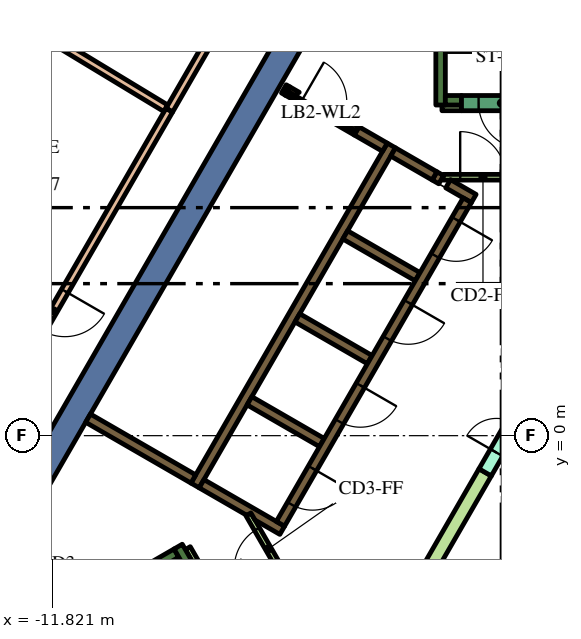
"""IFC4 building model, lengths in metres.
Left out: names, types, materials, properties, quantities, classifications, styles, units other than length and angle.
Written with IfcOpenShell. Run it as: python <this file> out.ifc"""

import sys

from ifc_helpers import new_model, si_unit, direction, frame, frame_2d, origin, place, context, subcontext, project, spatial, polyline, rectangle, outline, extrude, element, fill, save


model = new_model("IFC4")
c1 = context("Model", 3, precision=1e-05, world=origin(), true_north=direction((0.0, 1.0)))
c2 = subcontext(c1, "Body", "Model", "MODEL_VIEW")
j1 = project(units=[si_unit("LENGTHUNIT", "METRE"), si_unit("PLANEANGLEUNIT", "RADIAN")], contexts=[c1])
p1 = place(None, origin())
s1 = spatial("IfcSite", under=j1, at=p1, CompositionType="ELEMENT")
p2 = place(p1, origin())
s2 = spatial("IfcBuilding", under=s1, at=p2, CompositionType="ELEMENT")
p3 = place(p2, frame((0.0, 0.0, 256.2)))
s3 = spatial("IfcBuildingStorey", under=s2, at=p3, CompositionType="ELEMENT", Elevation=256.2)
p4 = place(p3, frame((-12.625, -1.867, 0.0), z_axis=(0.0, 0.0, 1.0), x_axis=(0.499996974394, 0.866027150612, 0.0)))
e1 = element("IfcWall", 1, at=p4, inside=s3, PredefinedType="SOLIDWALL", context=c2, shape_type="SweptSolid", body=[
    extrude(rectangle(XDim=15.858, YDim=0.7, at=frame_2d((7.929, 0.0))), origin(), (0.0, 0.0, 1.0), 5.4),
])
p5 = place(p3, frame((-1.6, 8.7, 0.0), z_axis=(0.0, 0.0, 1.0), x_axis=(0.0, 1.0, 0.0)))
e2 = element("IfcWall", 2, at=p5, inside=s3, PredefinedType="SOLIDWALL", context=c2, shape_type="SweptSolid", body=[
    extrude(rectangle(XDim=7.05, YDim=0.25, at=frame_2d((3.525, 0.0))), origin(), (0.0, 0.0, 1.0), 5.4),
])
p6 = place(p3, frame((-1.475, 8.825, 0.0), z_axis=(0.0, 0.0, 1.0), x_axis=(1.0, 0.0, 0.0)))
e3 = element("IfcWall", 3, at=p6, inside=s3, PredefinedType="SOLIDWALL", context=c2, shape_type="SweptSolid", body=[
    extrude(rectangle(XDim=0.425, YDim=0.25, at=frame_2d((0.212, 0.0))), origin(), (0.0, 0.0, 1.0), 5.4),
])
p7 = place(p3, frame((-14.44, -6.49, 0.0), z_axis=(0.0, 0.0, 1.0), x_axis=(0.866022966069, 0.500004222222, 0.0)))
e4 = element("IfcWall", 4, at=p7, inside=s3, PredefinedType="SOLIDWALL", context=c2, shape_type="SweptSolid", body=[
    extrude(rectangle(XDim=6.8, YDim=0.25, at=frame_2d((3.4, 0.0))), origin(), (0.0, 0.0, 1.0), 5.4),
])
p8 = place(p3, frame((-8.168, -3.503, 0.0), z_axis=(0.0, 0.0, 1.0), x_axis=(-0.499952099219, 0.866053057547, 0.0)))
e5 = element("IfcWall", 5, at=p8, inside=s3, PredefinedType="SOLIDWALL", context=c2, shape_type="SweptSolid", body=[
    extrude(rectangle(XDim=0.675, YDim=0.25, at=frame_2d((0.337, 0.0))), origin(), (0.0, 0.0, 1.0), 5.4),
])
p9 = place(p3, frame((-8.06, -1.311, 0.0), z_axis=(0.0, 0.0, 1.0), x_axis=(0.50000273126, 0.866023826885, 0.0)))
e6 = element("IfcWall", 6, at=p9, inside=s3, PredefinedType="SOLIDWALL", context=c2, shape_type="SweptSolid", body=[
    extrude(rectangle(XDim=10.33, YDim=0.25, at=frame_2d((5.165, 0.0))), origin(), (0.0, 0.0, 1.0), 5.4),
])
p10 = place(p3, frame((-1.758, 6.835, 0.0), z_axis=(0.0, 0.0, 1.0), x_axis=(0.865982457891, -0.500074377092, 0.0)))
e7 = element("IfcWall", 7, at=p10, inside=s3, PredefinedType="SOLIDWALL", context=c2, shape_type="SweptSolid", body=[
    extrude(rectangle(XDim=0.2, YDim=0.25, at=frame_2d((0.1, 0.0))), origin(), (0.0, 0.0, 1.0), 5.4),
])
p11 = place(p3, frame((-1.76, 6.836, 0.0), z_axis=(0.0, 0.0, 1.0), x_axis=(-0.865952863304, 0.500125622755, 0.0)))
e8 = element("IfcWall", 8, at=p11, inside=s3, PredefinedType="SOLIDWALL", context=c2, shape_type="SweptSolid", body=[
    extrude(rectangle(XDim=1.258, YDim=0.25, at=frame_2d((0.629, 0.0))), origin(), (0.0, 0.0, 1.0), 5.4),
])
p12 = place(p3, frame((-0.728, 6.24, 0.0), z_axis=(0.0, 0.0, 1.0), x_axis=(-0.865955664968, 0.500120771724, 0.0)))
e9 = element("IfcWall", 9, at=p12, inside=s3, PredefinedType="SOLIDWALL", context=c2, shape_type="SweptSolid", body=[
    extrude(rectangle(XDim=0.778, YDim=0.25, at=frame_2d((0.389, 0.0))), origin(), (0.0, 0.0, 1.0), 5.4),
])
for number, where, z_axis, x_axis in (
    (10, (-2.204, 4.182, 0.0), (0.0, 0.0, 1.0), (-0.866, 0.5, 0.0)),
    (11, (-5.369, 3.1, 0.0), (0.0, 0.0, 1.0), (0.866, -0.5, 0.0)),
    (12, (-4.724, -0.182, 0.0), (0.0, 0.0, 1.0), (-0.866, 0.5, 0.0)),
):
    element("IfcWall", number, at=place(p3, frame(where, z_axis=z_axis, x_axis=x_axis)), inside=s3, PredefinedType="SOLIDWALL", context=c2, shape_type="SweptSolid", body=[
        extrude(rectangle(XDim=2.2, YDim=0.25, at=frame_2d((1.1, 0.0))), origin(), (0.0, 0.0, 1.0), 5.4),
    ])
p13 = place(p3, origin())
e13 = element("IfcWall", 13, at=p13, inside=s3, PredefinedType="SOLIDWALL", context=c2, shape_type="SweptSolid", body=[
    extrude(outline(polyline([(-5.922, -2.257), (-5.922, -2.257), (-5.705, -2.382), (-5.83, -2.598), (-6.483, -2.221), (-6.591, -2.033), (-6.591, -2.033), (-6.7, -2.096), (-7.952, -1.373), (-7.827, -1.156), (-5.922, -2.257)])), origin(), (0.0, 0.0, 1.0), 5.4),
])
p14 = place(p3, frame((-8.106, -1.14, 0.0), z_axis=(0.0, 0.0, 1.0), x_axis=(-0.866008981251, 0.500028443584, 0.0)))
e14 = element("IfcWall", 14, at=p14, inside=s3, PredefinedType="SOLIDWALL", context=c2, shape_type="SweptSolid", body=[
    extrude(rectangle(XDim=3.2, YDim=0.25, at=frame_2d((1.6, 0.0))), origin(), (0.0, 0.0, 1.0), 5.4),
])
p15 = place(p3, frame((-5.725, 9.125, 0.0), z_axis=(0.0, 0.0, 1.0), x_axis=(0.866185586049, -0.49972245349, 0.0)))
e15 = element("IfcWall", 15, at=p15, inside=s3, PredefinedType="SOLIDWALL", context=c2, shape_type="SweptSolid", body=[
    extrude(rectangle(XDim=0.11, YDim=0.25, at=frame_2d((0.055, 0.0))), origin(), (0.0, 0.0, 1.0), 5.4),
])
p16 = place(p3, frame((-3.066, 7.59, 0.0), z_axis=(0.0, 0.0, 1.0), x_axis=(-0.866081358704, 0.49990307071, 0.0)))
e16 = element("IfcWall", 16, at=p16, inside=s3, PredefinedType="SOLIDWALL", context=c2, shape_type="SweptSolid", body=[
    extrude(rectangle(XDim=0.858, YDim=0.25, at=frame_2d((0.429, 0.0))), origin(), (0.0, 0.0, 1.0), 5.4),
])
e17 = element("IfcWall", 17, at=p13, inside=s3, PredefinedType="SOLIDWALL", context=c2, shape_type="SweptSolid", body=[
    extrude(outline(polyline([(-3.748, 8.128), (-3.813, 8.015), (-4.027, 8.139), (-4.017, 8.156), (-4.008, 8.173), (-4.0, 8.192), (-3.995, 8.21), (-3.991, 8.23), (-3.99, 8.25), (-3.99, 8.268), (-3.748, 8.128)])), origin(), (0.0, 0.0, 1.0), 5.4),
])
e18 = element("IfcWall", 18, at=p13, inside=s3, PredefinedType="SOLIDWALL", context=c2, shape_type="SweptSolid", body=[
    extrude(outline(polyline([(-5.689, 8.96), (-5.69, 8.961), (-5.565, 9.177), (-5.319, 9.035), (-5.335, 9.026), (-5.351, 9.015), (-5.366, 9.002), (-5.379, 8.988), (-5.392, 8.972), (-5.402, 8.956), (-5.412, 8.939), (-5.629, 9.064), (-5.629, 9.064), (-5.689, 8.96)])), origin(), (0.0, 0.0, 1.0), 5.4),
])
for number, where, z_axis, x_axis in (
    (19, (-8.252, -2.958, 0.0), (0.0, 0.0, 1.0), (0.5, -0.866, 0.0)),
    (20, (-1.564, 8.625, 0.0), (0.0, 0.0, 1.0), (1.0, 0.0, 0.0)),
):
    element("IfcWall", number, at=place(p3, frame(where, z_axis=z_axis, x_axis=x_axis)), inside=s3, PredefinedType="PARTITIONING", context=c2, shape_type="SweptSolid", body=[
        extrude(rectangle(XDim=0.514, YDim=0.15, at=frame_2d((0.257, 0.0))), origin(), (0.0, 0.0, 1.0), 4.3),
    ])
e21 = element("IfcWall", 21, at=p13, inside=s3, PredefinedType="PARTITIONING", context=c2, shape_type="SweptSolid", body=[
    extrude(outline(polyline([(-0.59, -0.872), (-0.265, -1.059), (-1.822, -3.756), (-2.147, -3.568), (-0.59, -0.872)])), origin(), (0.0, 0.0, 1.0), 4.3),
])
p17 = place(p3, frame((-0.898, 6.194, 0.0), z_axis=(0.0, 0.0, 1.0), x_axis=(-0.499996202215, -0.866027596426, 0.0)))
e22 = element("IfcWall", 22, at=p17, inside=s3, PredefinedType="SOLIDWALL", context=c2, shape_type="SweptSolid", body=[
    extrude(rectangle(XDim=9.83, YDim=0.25, at=frame_2d((4.915, 0.0))), origin(), (0.0, 0.0, 1.0), 5.4),
])
p18 = place(p17, frame((0.585, 0.0, 0.0)))
e23 = element("IfcOpeningElement", 23, at=p18, cuts=e22, PredefinedType="OPENING", context=c2, shape_type="SweptSolid", body=[
    extrude(rectangle(XDim=1.1, YDim=2.1, at=frame_2d((0.55, 1.05))), frame((0.0, 0.135, 0.0), z_axis=(0.0, -1.0, 0.0), x_axis=(1.0, 0.0, 0.0)), (0.0, 0.0, 1.0), 0.27),
])
p19 = place(p17, frame((3.105, 0.0, 0.0)))
e24 = element("IfcOpeningElement", 24, at=p19, cuts=e22, PredefinedType="OPENING", context=c2, shape_type="SweptSolid", body=[
    extrude(rectangle(XDim=1.1, YDim=2.1, at=frame_2d((0.55, 1.05))), frame((0.0, 0.135, 0.0), z_axis=(0.0, -1.0, 0.0), x_axis=(1.0, 0.0, 0.0)), (0.0, 0.0, 1.0), 0.27),
])
p20 = place(p17, frame((5.625, 0.0, 0.0)))
e25 = element("IfcOpeningElement", 25, at=p20, cuts=e22, PredefinedType="OPENING", context=c2, shape_type="SweptSolid", body=[
    extrude(rectangle(XDim=1.1, YDim=2.1, at=frame_2d((0.55, 1.05))), frame((0.0, 0.135, 0.0), z_axis=(0.0, -1.0, 0.0), x_axis=(1.0, 0.0, 0.0)), (0.0, 0.0, 1.0), 0.27),
])
p21 = place(p17, frame((8.145, 0.0, 0.0)))
e26 = element("IfcOpeningElement", 26, at=p21, cuts=e22, PredefinedType="OPENING", context=c2, shape_type="SweptSolid", body=[
    extrude(rectangle(XDim=1.1, YDim=2.1, at=frame_2d((0.55, 1.05))), frame((0.0, 0.135, 0.0), z_axis=(0.0, -1.0, 0.0), x_axis=(1.0, 0.0, 0.0)), (0.0, 0.0, 1.0), 0.27),
])
p22 = place(p3, frame((1.05, 8.75, 0.0), z_axis=(0.0, 0.0, 1.0), x_axis=(-1.0, 0.0, 0.0)))
e27 = element("IfcWall", 27, at=p22, inside=s3, PredefinedType="SOLIDWALL", context=c2, shape_type="SweptSolid", body=[
    extrude(rectangle(XDim=2.1, YDim=0.4, at=frame_2d((1.05, 0.0))), origin(), (0.0, 0.0, 1.0), 5.4),
])
p23 = place(p22, frame((0.45, 0.0, 0.0)))
e28 = element("IfcOpeningElement", 28, at=p23, cuts=e27, PredefinedType="OPENING", context=c2, shape_type="SweptSolid", body=[
    extrude(rectangle(XDim=1.2, YDim=2.1, at=frame_2d((0.6, 1.05))), frame((0.0, 0.21, 0.0), z_axis=(0.0, -1.0, 0.0), x_axis=(1.0, 0.0, 0.0)), (0.0, 0.0, 1.0), 0.42),
])
p24 = place(p3, frame((-0.427, -0.966, 0.0), z_axis=(0.0, 0.0, 1.0), x_axis=(0.49994051562, 0.866059744384, 0.0)))
e29 = element("IfcWall", 29, at=p24, inside=s3, PredefinedType="PARTITIONING", context=c2, shape_type="SweptSolid", body=[
    extrude(rectangle(XDim=2.1, YDim=0.375, at=frame_2d((1.05, 0.0))), origin(), (0.0, 0.0, 1.0), 4.3),
])
p25 = place(p24, frame((0.6, 0.0, 0.0)))
e30 = element("IfcOpeningElement", 30, at=p25, cuts=e29, PredefinedType="OPENING", context=c2, shape_type="SweptSolid", body=[
    extrude(rectangle(XDim=0.9, YDim=2.1, at=frame_2d((0.45, 1.05))), frame((0.0, 0.198, 0.0), z_axis=(0.0, -1.0, 0.0), x_axis=(1.0, 0.0, 0.0)), (0.0, 0.0, 1.0), 0.395),
])
p26 = place(p3, frame((-1.534, 6.8, 0.0), z_axis=(0.0, 0.0, 1.0), x_axis=(1.0, 0.0, 0.0)))
e31 = element("IfcWall", 31, at=p26, inside=s3, PredefinedType="PARTITIONING", context=c2, shape_type="SweptSolid", body=[
    extrude(rectangle(XDim=2.1, YDim=0.15, at=frame_2d((1.05, 0.0))), origin(), (0.0, 0.0, 1.0), 4.3),
])
p27 = place(p26, frame((0.45, 0.0, 0.0)))
e32 = element("IfcOpeningElement", 32, at=p27, cuts=e31, PredefinedType="OPENING", context=c2, shape_type="SweptSolid", body=[
    extrude(rectangle(XDim=1.2, YDim=2.1, at=frame_2d((0.6, 1.05))), frame((0.0, 0.085, 0.0), z_axis=(0.0, -1.0, 0.0), x_axis=(1.0, 0.0, 0.0)), (0.0, 0.0, 1.0), 0.17),
])
p28 = place(p3, frame((-5.606, -3.89, 0.0), z_axis=(0.0, 0.0, 1.0), x_axis=(-0.500027713859, 0.866009402589, 0.0)))
e33 = element("IfcWall", 33, at=p28, inside=s3, PredefinedType="PARTITIONING", context=c2, shape_type="SweptSolid", body=[
    extrude(rectangle(XDim=2.1, YDim=0.15, at=frame_2d((1.05, 0.0))), origin(), (0.0, 0.0, 1.0), 4.3),
])
p29 = place(p28, frame((0.45, 0.0, 0.0)))
e34 = element("IfcOpeningElement", 34, at=p29, cuts=e33, PredefinedType="OPENING", context=c2, shape_type="SweptSolid", body=[
    extrude(rectangle(XDim=1.2, YDim=2.1, at=frame_2d((0.6, 1.05))), frame((0.0, 0.085, 0.0), z_axis=(0.0, -1.0, 0.0), x_axis=(1.0, 0.0, 0.0)), (0.0, 0.0, 1.0), 0.17),
])
p30 = place(p3, frame((-5.659, 9.012, 0.0), z_axis=(0.0, 0.0, 1.0), x_axis=(0.866009402589, -0.500027713859, 0.0)))
e35 = element("IfcWall", 35, at=p30, inside=s3, PredefinedType="PARTITIONING", context=c2, shape_type="SweptSolid", body=[
    extrude(rectangle(XDim=2.1, YDim=0.12, at=frame_2d((1.05, 0.0))), origin(), (0.0, 0.0, 1.0), 4.3),
])
p31 = place(p30, frame((0.45, 0.0, 0.0)))
e36 = element("IfcOpeningElement", 36, at=p31, cuts=e35, PredefinedType="OPENING", context=c2, shape_type="SweptSolid", body=[
    extrude(rectangle(XDim=1.2, YDim=2.1, at=frame_2d((0.6, 1.05))), frame((0.0, 0.07, 0.0), z_axis=(0.0, -1.0, 0.0), x_axis=(1.0, 0.0, 0.0)), (0.0, 0.0, 1.0), 0.14),
])
p32 = place(p3, frame((-8.741, 8.561, 0.0), z_axis=(0.0, 0.0, 1.0), x_axis=(-0.500009820262, -0.866019733979, 0.0)))
e37 = element("IfcWall", 37, at=p32, inside=s3, PredefinedType="PARTITIONING", context=c2, shape_type="SweptSolid", body=[
    extrude(rectangle(XDim=12.183, YDim=0.2, at=frame_2d((6.092, 0.0))), origin(), (0.0, 0.0, 1.0), 4.3),
])
p33 = place(p32, frame((5.492, 0.0, 0.0)))
e38 = element("IfcOpeningElement", 38, at=p33, cuts=e37, PredefinedType="OPENING", context=c2, shape_type="SweptSolid", body=[
    extrude(rectangle(XDim=1.2, YDim=2.1, at=frame_2d((0.6, 1.05))), frame((0.0, 0.11, 0.0), z_axis=(0.0, -1.0, 0.0), x_axis=(1.0, 0.0, 0.0)), (0.0, 0.0, 1.0), 0.22),
])
p34 = place(p3, frame((-3.175, 18.2, 0.0), z_axis=(0.0, 0.0, 1.0), x_axis=(-0.500001798457, -0.866024365442, 0.0)))
e39 = element("IfcWall", 39, at=p34, inside=s3, PredefinedType="PARTITIONING", context=c2, shape_type="SweptSolid", body=[
    extrude(rectangle(XDim=11.121, YDim=0.2, at=frame_2d((5.561, 0.0))), origin(), (0.0, 0.0, 1.0), 4.3),
])
p35 = place(p34, frame((4.96, 0.0, 0.0)))
e40 = element("IfcOpeningElement", 40, at=p35, cuts=e39, PredefinedType="OPENING", context=c2, shape_type="SweptSolid", body=[
    extrude(rectangle(XDim=1.2, YDim=2.1, at=frame_2d((0.6, 1.05))), frame((0.0, 0.11, 0.0), z_axis=(0.0, -1.0, 0.0), x_axis=(1.0, 0.0, 0.0)), (0.0, 0.0, 1.0), 0.22),
])
p36 = place(p3, frame((-8.835, 8.617, 0.0), z_axis=(0.0, 0.0, 1.0), x_axis=(-0.855455591174, 0.517876173935, 0.0)))
e41 = element("IfcWall", 41, at=p36, inside=s3, PredefinedType="PARTITIONING", context=c2, shape_type="SweptSolid", body=[
    extrude(rectangle(XDim=6.206, YDim=0.2, at=frame_2d((3.103, 0.0))), origin(), (0.0, 0.0, 1.0), 4.3),
])
p37 = place(p18, origin())
e42 = element("IfcDoor", 42, at=p37, inside=s3, OperationType="DOUBLE_DOOR_SLIDING", PredefinedType="DOOR", context=c2, shape_type="SweptSolid", body=[
    extrude(rectangle(XDim=1.1, YDim=2.1, at=frame_2d((0.55, 1.05))), frame((0.0, 0.025, 0.0), z_axis=(0.0, -1.0, 0.0), x_axis=(1.0, 0.0, 0.0)), (0.0, 0.0, 1.0), 0.05),
])
fill(e23, e42)
p38 = place(p19, origin())
e43 = element("IfcDoor", 43, at=p38, inside=s3, OperationType="DOUBLE_DOOR_SLIDING", PredefinedType="DOOR", context=c2, shape_type="SweptSolid", body=[
    extrude(rectangle(XDim=1.1, YDim=2.1, at=frame_2d((0.55, 1.05))), frame((0.0, 0.025, 0.0), z_axis=(0.0, -1.0, 0.0), x_axis=(1.0, 0.0, 0.0)), (0.0, 0.0, 1.0), 0.05),
])
fill(e24, e43)
p39 = place(p20, origin())
e44 = element("IfcDoor", 44, at=p39, inside=s3, OperationType="DOUBLE_DOOR_SLIDING", PredefinedType="DOOR", context=c2, shape_type="SweptSolid", body=[
    extrude(rectangle(XDim=1.1, YDim=2.1, at=frame_2d((0.55, 1.05))), frame((0.0, 0.025, 0.0), z_axis=(0.0, -1.0, 0.0), x_axis=(1.0, 0.0, 0.0)), (0.0, 0.0, 1.0), 0.05),
])
fill(e25, e44)
p40 = place(p21, origin())
e45 = element("IfcDoor", 45, at=p40, inside=s3, OperationType="DOUBLE_DOOR_SLIDING", PredefinedType="DOOR", context=c2, shape_type="SweptSolid", body=[
    extrude(rectangle(XDim=1.1, YDim=2.1, at=frame_2d((0.55, 1.05))), frame((0.0, 0.025, 0.0), z_axis=(0.0, -1.0, 0.0), x_axis=(1.0, 0.0, 0.0)), (0.0, 0.0, 1.0), 0.05),
])
fill(e26, e45)
p41 = place(p23, origin())
e46 = element("IfcDoor", 46, at=p41, inside=s3, OperationType="SINGLE_SWING_LEFT", PredefinedType="DOOR", context=c2, shape_type="SweptSolid", body=[
    extrude(rectangle(XDim=1.2, YDim=2.1, at=frame_2d((0.6, 1.05))), frame((0.0, 0.025, 0.0), z_axis=(0.0, -1.0, 0.0), x_axis=(1.0, 0.0, 0.0)), (0.0, 0.0, 1.0), 0.05),
])
fill(e28, e46)
p42 = place(p25, origin())
e47 = element("IfcDoor", 47, at=p42, inside=s3, OperationType="SINGLE_SWING_LEFT", PredefinedType="DOOR", context=c2, shape_type="SweptSolid", body=[
    extrude(rectangle(XDim=0.9, YDim=2.1, at=frame_2d((0.45, 1.05))), frame((0.0, 0.025, 0.0), z_axis=(0.0, -1.0, 0.0), x_axis=(1.0, 0.0, 0.0)), (0.0, 0.0, 1.0), 0.05),
])
fill(e30, e47)
p43 = place(p27, origin())
e48 = element("IfcDoor", 48, at=p43, inside=s3, OperationType="SINGLE_SWING_LEFT", PredefinedType="DOOR", context=c2, shape_type="SweptSolid", body=[
    extrude(rectangle(XDim=1.2, YDim=2.1, at=frame_2d((0.6, 1.05))), frame((0.0, 0.025, 0.0), z_axis=(0.0, -1.0, 0.0), x_axis=(1.0, 0.0, 0.0)), (0.0, 0.0, 1.0), 0.05),
])
fill(e32, e48)
p44 = place(p29, origin())
e49 = element("IfcDoor", 49, at=p44, inside=s3, OperationType="SINGLE_SWING_LEFT", PredefinedType="DOOR", context=c2, shape_type="SweptSolid", body=[
    extrude(rectangle(XDim=1.2, YDim=2.1, at=frame_2d((0.6, 1.05))), frame((0.0, 0.025, 0.0), z_axis=(0.0, -1.0, 0.0), x_axis=(1.0, 0.0, 0.0)), (0.0, 0.0, 1.0), 0.05),
])
fill(e34, e49)
p45 = place(p31, origin())
e50 = element("IfcDoor", 50, at=p45, inside=s3, OperationType="SINGLE_SWING_LEFT", PredefinedType="DOOR", context=c2, shape_type="SweptSolid", body=[
    extrude(rectangle(XDim=1.2, YDim=2.1, at=frame_2d((0.6, 1.05))), frame((0.0, 0.025, 0.0), z_axis=(0.0, -1.0, 0.0), x_axis=(1.0, 0.0, 0.0)), (0.0, 0.0, 1.0), 0.05),
])
fill(e36, e50)
p46 = place(p33, origin())
e51 = element("IfcDoor", 51, at=p46, inside=s3, OperationType="SINGLE_SWING_RIGHT", PredefinedType="DOOR", context=c2, shape_type="SweptSolid", body=[
    extrude(rectangle(XDim=1.2, YDim=2.1, at=frame_2d((0.6, 1.05))), frame((0.0, 0.025, 0.0), z_axis=(0.0, -1.0, 0.0), x_axis=(1.0, 0.0, 0.0)), (0.0, 0.0, 1.0), 0.05),
])
fill(e38, e51)
save(model, sys.argv[1])
